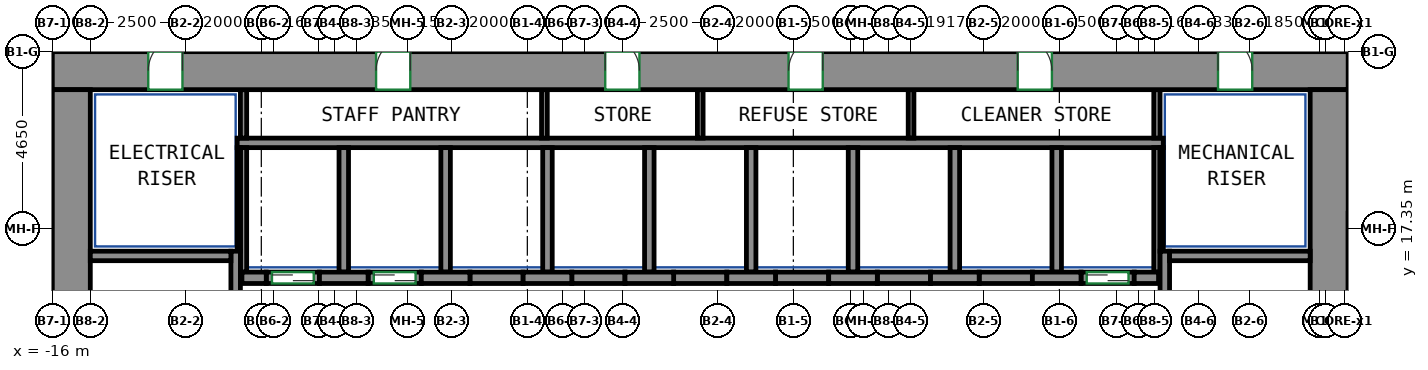
"""IFC4 building model, lengths in metres.
Left out: names, types, materials, properties, quantities, classifications, styles, units other than length and angle.
Written with IfcOpenShell. Run it as: python <this file> out.ifc"""

import sys

from ifc_helpers import new_model, si_unit, direction, frame, frame_2d, origin, place, context, subcontext, project, spatial, rectangle, extrude, source, transform, mapped, element, fill, save


model = new_model("IFC4")
c1 = context("Model", 3, precision=1e-05, world=origin(), true_north=direction((0.0, 1.0)))
c2 = subcontext(c1, "Body", "Model", "MODEL_VIEW")
j1 = project(units=[si_unit("LENGTHUNIT", "METRE"), si_unit("PLANEANGLEUNIT", "RADIAN")], contexts=[c1])
p1 = place(None, origin())
s1 = spatial("IfcSite", under=j1, at=p1, CompositionType="ELEMENT")
p2 = place(p1, origin())
s2 = spatial("IfcBuilding", under=s1, at=p2, CompositionType="ELEMENT")
p3 = place(p2, frame((0.0, 0.0, 31.0)))
s3 = spatial("IfcBuildingStorey", under=s2, at=p3, CompositionType="ELEMENT", Elevation=31.0)
m1 = source(origin(), c2, "Body", "SweptSolid", [
    extrude(rectangle(XDim=34.1, YDim=1.0, at=frame_2d((17.05, 0.0))), origin(), (0.0, 0.0, 1.0), 3.72),
])
p4 = place(p3, frame((-16.0, 21.5, 0.0), z_axis=(0.0, 0.0, 1.0), x_axis=(1.0, 0.0, 0.0)))
e1 = element("IfcWall", 1, at=p4, inside=s3, PredefinedType="SHEAR", context=c2, shape_type="MappedRepresentation", body=[
    mapped(m1, transform((0.0, 0.0, 0.0))),
])
p5 = place(p4, frame((8.52, 0.0, 0.0)))
e2 = element("IfcOpeningElement", 2, at=p5, cuts=e1, PredefinedType="OPENING", context=c2, shape_type="SweptSolid", body=[
    extrude(rectangle(XDim=0.9, YDim=2.1, at=frame_2d((0.45, 1.05))), frame((0.0, 0.51, 0.0), z_axis=(0.0, -1.0, 0.0), x_axis=(1.0, 0.0, 0.0)), (0.0, 0.0, 1.0), 1.02),
])
p6 = place(p4, frame((14.55, 0.0, 0.0)))
e3 = element("IfcOpeningElement", 3, at=p6, cuts=e1, PredefinedType="OPENING", context=c2, shape_type="SweptSolid", body=[
    extrude(rectangle(XDim=0.9, YDim=2.1, at=frame_2d((0.45, 1.05))), frame((0.0, 0.51, 0.0), z_axis=(0.0, -1.0, 0.0), x_axis=(1.0, 0.0, 0.0)), (0.0, 0.0, 1.0), 1.02),
])
p7 = place(p4, frame((19.374, 0.0, 0.0)))
e4 = element("IfcOpeningElement", 4, at=p7, cuts=e1, PredefinedType="OPENING", context=c2, shape_type="SweptSolid", body=[
    extrude(rectangle(XDim=0.9, YDim=2.1, at=frame_2d((0.45, 1.05))), frame((0.0, 0.51, 0.0), z_axis=(0.0, -1.0, 0.0), x_axis=(1.0, 0.0, 0.0)), (0.0, 0.0, 1.0), 1.02),
])
p8 = place(p4, frame((25.404, 0.0, 0.0)))
e5 = element("IfcOpeningElement", 5, at=p8, cuts=e1, PredefinedType="OPENING", context=c2, shape_type="SweptSolid", body=[
    extrude(rectangle(XDim=0.9, YDim=2.1, at=frame_2d((0.45, 1.05))), frame((0.0, 0.51, 0.0), z_axis=(0.0, -1.0, 0.0), x_axis=(1.0, 0.0, 0.0)), (0.0, 0.0, 1.0), 1.02),
])
p9 = place(p4, frame((2.525, 0.0, 0.0)))
e6 = element("IfcOpeningElement", 6, at=p9, cuts=e1, PredefinedType="OPENING", context=c2, shape_type="SweptSolid", body=[
    extrude(rectangle(XDim=0.9, YDim=2.1, at=frame_2d((0.45, 1.05))), frame((0.0, 0.51, 0.0), z_axis=(0.0, -1.0, 0.0), x_axis=(1.0, 0.0, 0.0)), (0.0, 0.0, 1.0), 1.02),
])
p10 = place(p4, frame((30.675, 0.0, 0.0)))
e7 = element("IfcOpeningElement", 7, at=p10, cuts=e1, PredefinedType="OPENING", context=c2, shape_type="SweptSolid", body=[
    extrude(rectangle(XDim=0.9, YDim=2.1, at=frame_2d((0.45, 1.05))), frame((0.0, 0.51, 0.0), z_axis=(0.0, -1.0, 0.0), x_axis=(1.0, 0.0, 0.0)), (0.0, 0.0, 1.0), 1.02),
])
m2 = source(origin(), c2, "Body", "SweptSolid", [
    extrude(rectangle(XDim=12.0, YDim=1.0, at=frame_2d((6.0, 0.0))), origin(), (0.0, 0.0, 1.0), 3.72),
])
for number, where, z_axis, x_axis in (
    (8, (-15.5, 9.0, 0.0), (0.0, 0.0, 1.0), (0.0, 1.0, 0.0)),
    (9, (17.6, 9.0, 0.0), (0.0, 0.0, 1.0), (0.0, 1.0, 0.0)),
):
    element("IfcWall", number, at=place(p3, frame(where, z_axis=z_axis, x_axis=x_axis)), inside=s3, PredefinedType="SHEAR", context=c2, shape_type="MappedRepresentation", body=[
        mapped(m2, transform((0.0, 0.0, 0.0))),
    ])
m3 = source(origin(), c2, "Body", "SweptSolid", [
    extrude(rectangle(XDim=7.75, YDim=0.25, at=frame_2d((3.875, 0.0))), origin(), (0.0, 0.0, 1.0), 3.72),
])
p11 = place(p3, frame((-11.175, 9.0, 0.0), z_axis=(0.0, 0.0, 1.0), x_axis=(0.0, 1.0, 0.0)))
e10 = element("IfcWall", 10, at=p11, inside=s3, PredefinedType="SHEAR", context=c2, shape_type="MappedRepresentation", body=[
    mapped(m3, transform((0.0, 0.0, 0.0))),
])
m4 = source(origin(), c2, "Body", "SweptSolid", [
    extrude(rectangle(XDim=3.7, YDim=0.25, at=frame_2d((1.85, 0.0))), origin(), (0.0, 0.0, 1.0), 3.72),
])
p12 = place(p3, frame((-15.0, 16.625, 0.0), z_axis=(0.0, 0.0, 1.0), x_axis=(1.0, 0.0, 0.0)))
e11 = element("IfcWall", 11, at=p12, inside=s3, PredefinedType="SHEAR", context=c2, shape_type="MappedRepresentation", body=[
    mapped(m4, transform((0.0, 0.0, 0.0))),
])
p13 = place(p3, frame((13.275, 9.0, 0.0), z_axis=(0.0, 0.0, 1.0), x_axis=(0.0, 1.0, 0.0)))
e12 = element("IfcWall", 12, at=p13, inside=s3, PredefinedType="SHEAR", context=c2, shape_type="MappedRepresentation", body=[
    mapped(m3, transform((0.0, 0.0, 0.0))),
])
m5 = source(origin(), c2, "Body", "SweptSolid", [
    extrude(rectangle(XDim=3.7, YDim=0.25, at=frame_2d((1.85, 0.0))), origin(), (0.0, 0.0, 1.0), 3.72),
])
p14 = place(p3, frame((13.4, 16.625, 0.0), z_axis=(0.0, 0.0, 1.0), x_axis=(1.0, 0.0, 0.0)))
e13 = element("IfcWall", 13, at=p14, inside=s3, PredefinedType="SHEAR", context=c2, shape_type="MappedRepresentation", body=[
    mapped(m5, transform((0.0, 0.0, 0.0))),
])
m6 = source(origin(), c2, "Body", "SweptSolid", [
    extrude(rectangle(XDim=0.64, YDim=0.3, at=frame_2d((0.32, 0.0))), origin(), (0.0, 0.0, 1.0), 3.72),
])
p15 = place(p3, frame((-11.01, 16.05, 0.0), z_axis=(0.0, 0.0, 1.0), x_axis=(1.0, 0.0, 0.0)))
e14 = element("IfcWall", 14, at=p15, inside=s3, PredefinedType="SHEAR", context=c2, shape_type="MappedRepresentation", body=[
    mapped(m6, transform((0.0, 0.0, 0.0))),
])
m7 = source(origin(), c2, "Body", "SweptSolid", [
    extrude(rectangle(XDim=1.28, YDim=0.3, at=frame_2d((0.64, 0.0))), origin(), (0.0, 0.0, 1.0), 3.72),
])
for number, where, z_axis, x_axis in (
    (15, (-8.97, 16.05, 0.0), (0.0, 0.0, 1.0), (1.0, 0.0, 0.0)),
    (16, (-6.29, 16.05, 0.0), (0.0, 0.0, 1.0), (1.0, 0.0, 0.0)),
    (17, (-3.61, 16.05, 0.0), (0.0, 0.0, 1.0), (1.0, 0.0, 0.0)),
    (18, (-0.93, 16.05, 0.0), (0.0, 0.0, 1.0), (1.0, 0.0, 0.0)),
    (19, (1.75, 16.05, 0.0), (0.0, 0.0, 1.0), (1.0, 0.0, 0.0)),
    (20, (4.43, 16.05, 0.0), (0.0, 0.0, 1.0), (1.0, 0.0, 0.0)),
):
    element("IfcWall", number, at=place(p3, frame(where, z_axis=z_axis, x_axis=x_axis)), inside=s3, PredefinedType="SHEAR", context=c2, shape_type="MappedRepresentation", body=[
        mapped(m7, transform((0.0, 0.0, 0.0))),
    ])
m8 = source(origin(), c2, "Body", "SweptSolid", [
    extrude(rectangle(XDim=1.28, YDim=0.3, at=frame_2d((0.64, 0.0))), origin(), (0.0, 0.0, 1.0), 3.72),
])
p16 = place(p3, frame((7.11, 16.05, 0.0), z_axis=(0.0, 0.0, 1.0), x_axis=(1.0, 0.0, 0.0)))
e21 = element("IfcWall", 21, at=p16, inside=s3, PredefinedType="SHEAR", context=c2, shape_type="MappedRepresentation", body=[
    mapped(m8, transform((0.0, 0.0, 0.0))),
])
p17 = place(p3, frame((9.79, 16.05, 0.0), z_axis=(0.0, 0.0, 1.0), x_axis=(1.0, 0.0, 0.0)))
e22 = element("IfcWall", 22, at=p17, inside=s3, PredefinedType="SHEAR", context=c2, shape_type="MappedRepresentation", body=[
    mapped(m7, transform((0.0, 0.0, 0.0))),
])
m9 = source(origin(), c2, "Body", "SweptSolid", [
    extrude(rectangle(XDim=0.64, YDim=0.3, at=frame_2d((0.32, 0.0))), origin(), (0.0, 0.0, 1.0), 3.72),
])
p18 = place(p3, frame((12.47, 16.05, 0.0), z_axis=(0.0, 0.0, 1.0), x_axis=(1.0, 0.0, 0.0)))
e23 = element("IfcWall", 23, at=p18, inside=s3, PredefinedType="SHEAR", context=c2, shape_type="MappedRepresentation", body=[
    mapped(m9, transform((0.0, 0.0, 0.0))),
])
m10 = source(origin(), c2, "Body", "SweptSolid", [
    extrude(rectangle(XDim=1.4, YDim=0.3, at=frame_2d((0.7, 0.0))), origin(), (0.0, 0.0, 1.0), 3.72),
])
p19 = place(p3, frame((11.07, 16.05, 0.0), z_axis=(0.0, 0.0, 1.0), x_axis=(1.0, 0.0, 0.0)))
e24 = element("IfcWall", 24, at=p19, inside=s3, PredefinedType="PARTITIONING", context=c2, shape_type="MappedRepresentation", body=[
    mapped(m10, transform((0.0, 0.0, 0.0))),
])
p20 = place(p19, frame((0.15, 0.0, 0.0)))
e25 = element("IfcOpeningElement", 25, at=p20, cuts=e24, PredefinedType="OPENING", context=c2, shape_type="SweptSolid", body=[
    extrude(rectangle(XDim=1.1, YDim=2.1, at=frame_2d((0.55, 1.05))), frame((0.0, 0.16, 0.0), z_axis=(0.0, -1.0, 0.0), x_axis=(1.0, 0.0, 0.0)), (0.0, 0.0, 1.0), 0.32),
])
m11 = source(origin(), c2, "Body", "SweptSolid", [
    extrude(rectangle(XDim=1.4, YDim=0.3, at=frame_2d((0.7, 0.0))), origin(), (0.0, 0.0, 1.0), 3.72),
])
p21 = place(p3, frame((-10.37, 16.05, 0.0), z_axis=(0.0, 0.0, 1.0), x_axis=(1.0, 0.0, 0.0)))
e26 = element("IfcWall", 26, at=p21, inside=s3, PredefinedType="PARTITIONING", context=c2, shape_type="MappedRepresentation", body=[
    mapped(m11, transform((0.0, 0.0, 0.0))),
])
p22 = place(p21, frame((0.15, 0.0, 0.0)))
e27 = element("IfcOpeningElement", 27, at=p22, cuts=e26, PredefinedType="OPENING", context=c2, shape_type="SweptSolid", body=[
    extrude(rectangle(XDim=1.1, YDim=2.1, at=frame_2d((0.55, 1.05))), frame((0.0, 0.16, 0.0), z_axis=(0.0, -1.0, 0.0), x_axis=(1.0, 0.0, 0.0)), (0.0, 0.0, 1.0), 0.32),
])
p23 = place(p3, frame((-7.69, 16.05, 0.0), z_axis=(0.0, 0.0, 1.0), x_axis=(1.0, 0.0, 0.0)))
e28 = element("IfcWall", 28, at=p23, inside=s3, PredefinedType="PARTITIONING", context=c2, shape_type="MappedRepresentation", body=[
    mapped(m10, transform((0.0, 0.0, 0.0))),
])
p24 = place(p23, frame((0.15, 0.0, 0.0)))
e29 = element("IfcOpeningElement", 29, at=p24, cuts=e28, PredefinedType="OPENING", context=c2, shape_type="SweptSolid", body=[
    extrude(rectangle(XDim=1.1, YDim=2.1, at=frame_2d((0.55, 1.05))), frame((0.0, 0.16, 0.0), z_axis=(0.0, -1.0, 0.0), x_axis=(1.0, 0.0, 0.0)), (0.0, 0.0, 1.0), 0.32),
])
p25 = place(p3, frame((-5.01, 16.05, 0.0), z_axis=(0.0, 0.0, 1.0), x_axis=(1.0, 0.0, 0.0)))
e30 = element("IfcWall", 30, at=p25, inside=s3, PredefinedType="PARTITIONING", context=c2, shape_type="MappedRepresentation", body=[
    mapped(m10, transform((0.0, 0.0, 0.0))),
])
p26 = place(p3, frame((-2.33, 16.05, 0.0), z_axis=(0.0, 0.0, 1.0), x_axis=(1.0, 0.0, 0.0)))
e31 = element("IfcWall", 31, at=p26, inside=s3, PredefinedType="PARTITIONING", context=c2, shape_type="MappedRepresentation", body=[
    mapped(m11, transform((0.0, 0.0, 0.0))),
])
for number, where, z_axis, x_axis in (
    (32, (0.35, 16.05, 0.0), (0.0, 0.0, 1.0), (1.0, 0.0, 0.0)),
    (33, (3.03, 16.05, 0.0), (0.0, 0.0, 1.0), (1.0, 0.0, 0.0)),
):
    element("IfcWall", number, at=place(p3, frame(where, z_axis=z_axis, x_axis=x_axis)), inside=s3, PredefinedType="PARTITIONING", context=c2, shape_type="MappedRepresentation", body=[
        mapped(m10, transform((0.0, 0.0, 0.0))),
    ])
for number, where, z_axis, x_axis in (
    (34, (5.71, 16.05, 0.0), (0.0, 0.0, 1.0), (1.0, 0.0, 0.0)),
    (35, (8.39, 16.05, 0.0), (0.0, 0.0, 1.0), (1.0, 0.0, 0.0)),
):
    element("IfcWall", number, at=place(p3, frame(where, z_axis=z_axis, x_axis=x_axis)), inside=s3, PredefinedType="PARTITIONING", context=c2, shape_type="MappedRepresentation", body=[
        mapped(m11, transform((0.0, 0.0, 0.0))),
    ])
m12 = source(origin(), c2, "Body", "SweptSolid", [
    extrude(rectangle(XDim=24.37, YDim=0.25, at=frame_2d((12.185, 0.0))), origin(), (0.0, 0.0, 1.0), 3.72),
])
p27 = place(p3, frame((-11.135, 19.6, 0.0), z_axis=(0.0, 0.0, 1.0), x_axis=(1.0, 0.0, 0.0)))
e36 = element("IfcWall", 36, at=p27, inside=s3, PredefinedType="PARTITIONING", context=c2, shape_type="MappedRepresentation", body=[
    mapped(m12, transform((0.0, 0.0, 0.0))),
])
m13 = source(origin(), c2, "Body", "SweptSolid", [
    extrude(rectangle(XDim=3.275, YDim=0.165, at=frame_2d((1.638, 0.0))), origin(), (0.0, 0.0, 1.0), 3.72),
])
p28 = place(p3, frame((13.067, 16.2, 0.0), z_axis=(0.0, 0.0, 1.0), x_axis=(0.0, 1.0, 0.0)))
e37 = element("IfcWall", 37, at=p28, inside=s3, PredefinedType="PARTITIONING", context=c2, shape_type="MappedRepresentation", body=[
    mapped(m13, transform((0.0, 0.0, 0.0))),
])
m14 = source(origin(), c2, "Body", "SweptSolid", [
    extrude(rectangle(XDim=1.275, YDim=0.165, at=frame_2d((0.637, 0.0))), origin(), (0.0, 0.0, 1.0), 3.72),
])
p29 = place(p3, frame((13.067, 19.725, 0.0), z_axis=(0.0, 0.0, 1.0), x_axis=(0.0, 1.0, 0.0)))
e38 = element("IfcWall", 38, at=p29, inside=s3, PredefinedType="PARTITIONING", context=c2, shape_type="MappedRepresentation", body=[
    mapped(m14, transform((0.0, 0.0, 0.0))),
])
p30 = place(p3, frame((-10.968, 16.2, 0.0), z_axis=(0.0, 0.0, 1.0), x_axis=(0.0, 1.0, 0.0)))
e39 = element("IfcWall", 39, at=p30, inside=s3, PredefinedType="PARTITIONING", context=c2, shape_type="MappedRepresentation", body=[
    mapped(m13, transform((0.0, 0.0, 0.0))),
])
p31 = place(p3, frame((-10.968, 19.725, 0.0), z_axis=(0.0, 0.0, 1.0), x_axis=(0.0, 1.0, 0.0)))
e40 = element("IfcWall", 40, at=p31, inside=s3, PredefinedType="PARTITIONING", context=c2, shape_type="MappedRepresentation", body=[
    mapped(m14, transform((0.0, 0.0, 0.0))),
])
m15 = source(origin(), c2, "Body", "SweptSolid", [
    extrude(rectangle(XDim=3.275, YDim=0.25, at=frame_2d((1.638, 0.0))), origin(), (0.0, 0.0, 1.0), 3.72),
])
p32 = place(p3, frame((10.43, 16.2, 0.0), z_axis=(0.0, 0.0, 1.0), x_axis=(0.0, 1.0, 0.0)))
e41 = element("IfcWall", 41, at=p32, inside=s3, PredefinedType="PARTITIONING", context=c2, shape_type="MappedRepresentation", body=[
    mapped(m15, transform((0.0, 0.0, 0.0))),
])
m16 = source(origin(), c2, "Body", "SweptSolid", [
    extrude(rectangle(XDim=2.725, YDim=0.085, at=frame_2d((1.363, 0.0))), origin(), (0.0, 0.0, 1.0), 3.72),
])
p33 = place(p3, frame((13.192, 16.75, 0.0), z_axis=(0.0, 0.0, 1.0), x_axis=(0.0, 1.0, 0.0)))
e42 = element("IfcWall", 42, at=p33, inside=s3, PredefinedType="PARTITIONING", context=c2, shape_type="MappedRepresentation", body=[
    mapped(m16, transform((0.0, 0.0, 0.0))),
])
for number, where, z_axis, x_axis in (
    (43, (2.39, 16.2, 0.0), (0.0, 0.0, 1.0), (0.0, 1.0, 0.0)),
    (44, (5.07, 16.2, 0.0), (0.0, 0.0, 1.0), (0.0, 1.0, 0.0)),
    (45, (7.75, 16.2, 0.0), (0.0, 0.0, 1.0), (0.0, 1.0, 0.0)),
    (46, (-0.29, 16.2, 0.0), (0.0, 0.0, 1.0), (0.0, 1.0, 0.0)),
):
    element("IfcWall", number, at=place(p3, frame(where, z_axis=z_axis, x_axis=x_axis)), inside=s3, PredefinedType="PARTITIONING", context=c2, shape_type="MappedRepresentation", body=[
        mapped(m15, transform((0.0, 0.0, 0.0))),
    ])
p34 = place(p3, frame((-11.093, 16.75, 0.0), z_axis=(0.0, 0.0, 1.0), x_axis=(0.0, 1.0, 0.0)))
e47 = element("IfcWall", 47, at=p34, inside=s3, PredefinedType="PARTITIONING", context=c2, shape_type="MappedRepresentation", body=[
    mapped(m16, transform((0.0, 0.0, 0.0))),
])
for number, where, z_axis, x_axis in (
    (48, (-2.97, 16.2, 0.0), (0.0, 0.0, 1.0), (0.0, 1.0, 0.0)),
    (49, (-5.65, 16.2, 0.0), (0.0, 0.0, 1.0), (0.0, 1.0, 0.0)),
    (50, (-8.33, 16.2, 0.0), (0.0, 0.0, 1.0), (0.0, 1.0, 0.0)),
):
    element("IfcWall", number, at=place(p3, frame(where, z_axis=z_axis, x_axis=x_axis)), inside=s3, PredefinedType="PARTITIONING", context=c2, shape_type="MappedRepresentation", body=[
        mapped(m15, transform((0.0, 0.0, 0.0))),
    ])
m17 = source(origin(), c2, "Body", "SweptSolid", [
    extrude(rectangle(XDim=1.275, YDim=0.15, at=frame_2d((0.637, 0.0))), origin(), (0.0, 0.0, 1.0), 3.72),
])
for number, where, z_axis, x_axis in (
    (51, (-3.05, 19.725, 0.0), (0.0, 0.0, 1.0), (0.0, 1.0, 0.0)),
    (52, (1.05, 19.725, 0.0), (0.0, 0.0, 1.0), (0.0, 1.0, 0.0)),
    (53, (6.598, 19.725, 0.0), (0.0, 0.0, 1.0), (0.0, 1.0, 0.0)),
):
    element("IfcWall", number, at=place(p3, frame(where, z_axis=z_axis, x_axis=x_axis)), inside=s3, PredefinedType="PARTITIONING", context=c2, shape_type="MappedRepresentation", body=[
        mapped(m17, transform((0.0, 0.0, 0.0))),
    ])
p35 = place(p20, origin())
e54 = element("IfcDoor", 54, at=p35, inside=s3, OperationType="DOUBLE_DOOR_SLIDING", PredefinedType="DOOR", context=c2, shape_type="SweptSolid", body=[
    extrude(rectangle(XDim=1.1, YDim=2.1, at=frame_2d((0.55, 1.05))), frame((0.0, 0.025, 0.0), z_axis=(0.0, -1.0, 0.0), x_axis=(1.0, 0.0, 0.0)), (0.0, 0.0, 1.0), 0.05),
])
fill(e25, e54)
p36 = place(p22, origin())
e55 = element("IfcDoor", 55, at=p36, inside=s3, OperationType="DOUBLE_DOOR_SLIDING", PredefinedType="DOOR", context=c2, shape_type="SweptSolid", body=[
    extrude(rectangle(XDim=1.1, YDim=2.1, at=frame_2d((0.55, 1.05))), frame((0.0, 0.025, 0.0), z_axis=(0.0, -1.0, 0.0), x_axis=(1.0, 0.0, 0.0)), (0.0, 0.0, 1.0), 0.05),
])
fill(e27, e55)
p37 = place(p24, origin())
e56 = element("IfcDoor", 56, at=p37, inside=s3, OperationType="DOUBLE_DOOR_SLIDING", PredefinedType="DOOR", context=c2, shape_type="SweptSolid", body=[
    extrude(rectangle(XDim=1.1, YDim=2.1, at=frame_2d((0.55, 1.05))), frame((0.0, 0.025, 0.0), z_axis=(0.0, -1.0, 0.0), x_axis=(1.0, 0.0, 0.0)), (0.0, 0.0, 1.0), 0.05),
])
fill(e29, e56)
p38 = place(p5, origin())
e57 = element("IfcDoor", 57, at=p38, inside=s3, OperationType="SINGLE_SWING_RIGHT", PredefinedType="DOOR", context=c2, shape_type="SweptSolid", body=[
    extrude(rectangle(XDim=0.9, YDim=2.1, at=frame_2d((0.45, 1.05))), frame((0.0, -0.355, 0.0), z_axis=(0.0, -1.0, 0.0), x_axis=(1.0, 0.0, 0.0)), (0.0, 0.0, 1.0), 0.05),
])
fill(e2, e57)
p39 = place(p6, origin())
e58 = element("IfcDoor", 58, at=p39, inside=s3, OperationType="SINGLE_SWING_LEFT", PredefinedType="DOOR", context=c2, shape_type="SweptSolid", body=[
    extrude(rectangle(XDim=0.9, YDim=2.1, at=frame_2d((0.45, 1.05))), frame((0.0, -0.355, 0.0), z_axis=(0.0, -1.0, 0.0), x_axis=(1.0, 0.0, 0.0)), (0.0, 0.0, 1.0), 0.05),
])
fill(e3, e58)
p40 = place(p7, origin())
e59 = element("IfcDoor", 59, at=p40, inside=s3, OperationType="SINGLE_SWING_RIGHT", PredefinedType="DOOR", context=c2, shape_type="SweptSolid", body=[
    extrude(rectangle(XDim=0.9, YDim=2.1, at=frame_2d((0.45, 1.05))), frame((0.0, -0.355, 0.0), z_axis=(0.0, -1.0, 0.0), x_axis=(1.0, 0.0, 0.0)), (0.0, 0.0, 1.0), 0.05),
])
fill(e4, e59)
p41 = place(p8, origin())
e60 = element("IfcDoor", 60, at=p41, inside=s3, OperationType="SINGLE_SWING_LEFT", PredefinedType="DOOR", context=c2, shape_type="SweptSolid", body=[
    extrude(rectangle(XDim=0.9, YDim=2.1, at=frame_2d((0.45, 1.05))), frame((0.0, -0.355, 0.0), z_axis=(0.0, -1.0, 0.0), x_axis=(1.0, 0.0, 0.0)), (0.0, 0.0, 1.0), 0.05),
])
fill(e5, e60)
p42 = place(p9, origin())
e61 = element("IfcDoor", 61, at=p42, inside=s3, OperationType="SINGLE_SWING_RIGHT", PredefinedType="DOOR", context=c2, shape_type="SweptSolid", body=[
    extrude(rectangle(XDim=0.9, YDim=2.1, at=frame_2d((0.45, 1.05))), frame((0.0, -0.355, 0.0), z_axis=(0.0, -1.0, 0.0), x_axis=(1.0, 0.0, 0.0)), (0.0, 0.0, 1.0), 0.05),
])
fill(e6, e61)
p43 = place(p10, origin())
e62 = element("IfcDoor", 62, at=p43, inside=s3, OperationType="SINGLE_SWING_LEFT", PredefinedType="DOOR", context=c2, shape_type="SweptSolid", body=[
    extrude(rectangle(XDim=0.9, YDim=2.1, at=frame_2d((0.45, 1.05))), frame((0.0, -0.355, 0.0), z_axis=(0.0, -1.0, 0.0), x_axis=(1.0, 0.0, 0.0)), (0.0, 0.0, 1.0), 0.05),
])
fill(e7, e62)
save(model, sys.argv[1])
